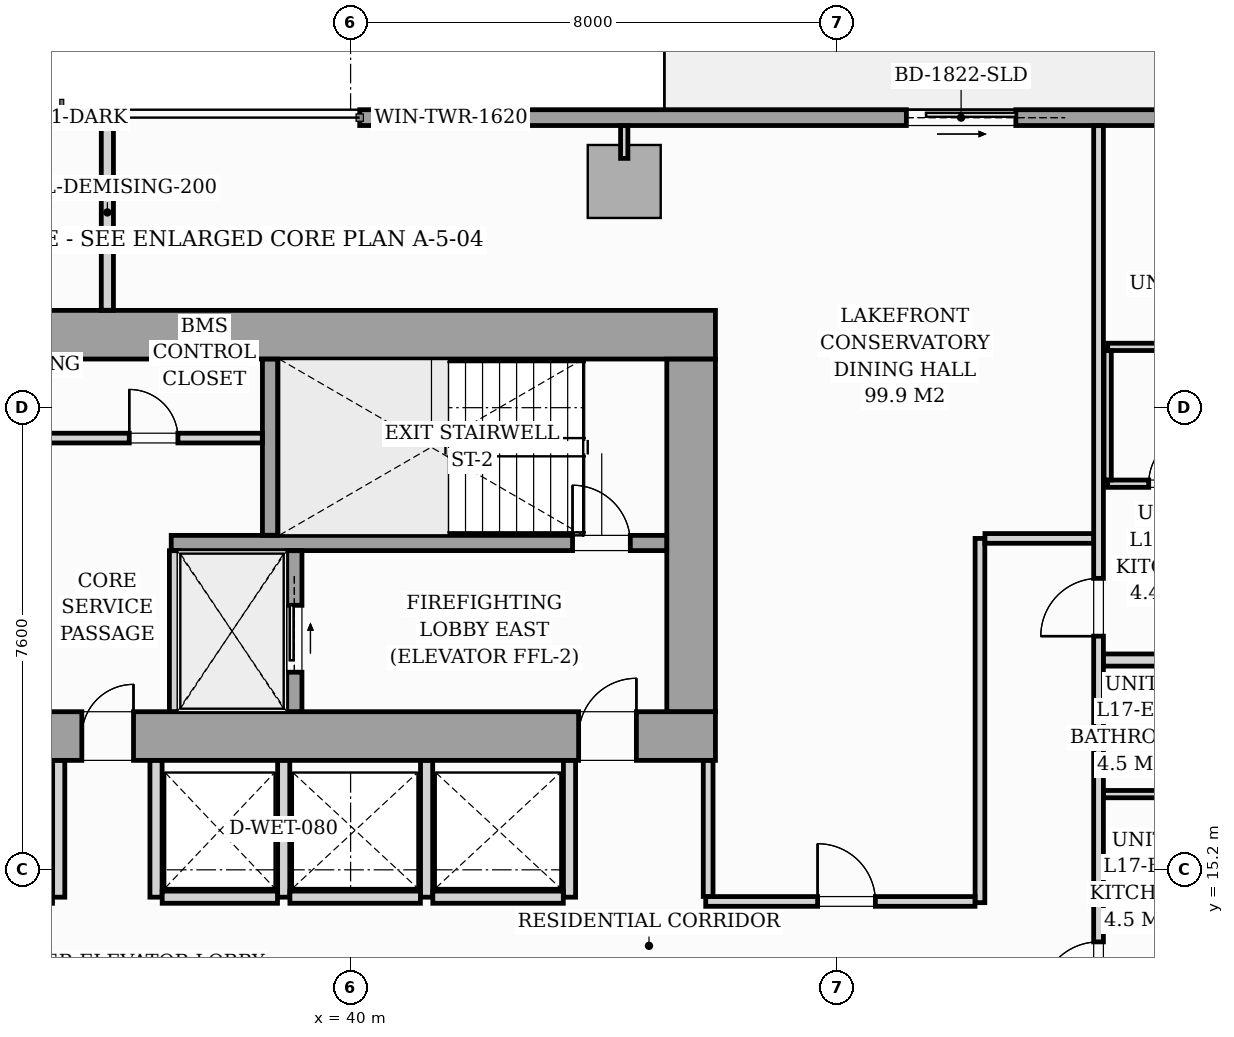
"""IFC4 building model, lengths in metres.
Left out: names, types, materials, properties, quantities, classifications, styles, units other than length and angle.
Written with IfcOpenShell. Run it as: python <this file> out.ifc"""

import sys

from ifc_helpers import new_model, si_unit, direction, frame, frame_2d, origin, origin_2d, place, context, subcontext, project, spatial, rectangle, i_section, extrude, source, transform, mapped, element, fill, save


model = new_model("IFC4")
c1 = context("Model", 3, precision=1e-05, world=origin(), true_north=direction((0.0, 1.0)))
c2 = subcontext(c1, "Body", "Model", "MODEL_VIEW")
j1 = project(units=[si_unit("LENGTHUNIT", "METRE"), si_unit("PLANEANGLEUNIT", "RADIAN")], contexts=[c1])
p1 = place(None, origin())
s1 = spatial("IfcSite", under=j1, at=p1, CompositionType="ELEMENT")
p2 = place(p1, origin())
s2 = spatial("IfcBuilding", under=s1, at=p2, CompositionType="ELEMENT")
p3 = place(p2, frame((0.0, 0.0, 61.4)))
s3 = spatial("IfcBuildingStorey", under=s2, at=p3, CompositionType="ELEMENT", Elevation=61.4)
m1 = source(origin(), c2, "Body", "SweptSolid", [
    extrude(i_section(OverallWidth=0.437, OverallDepth=0.514, WebThickness=0.061, FlangeThickness=0.097, FilletRadius=0.018, at=origin_2d()), origin(), (0.0, 0.0, 1.0), 3.196),
])
for number, where, z_axis, x_axis in (
    (1, (38.88, 17.4, 0.002), (0.0, 0.0, 1.0), (1.0, 0.0, 0.0)),
    (2, (45.6, 17.4, 0.002), (0.0, 0.0, 1.0), (1.0, 0.0, 0.0)),
    (3, (38.88, 24.0, 0.002), (0.0, 0.0, 1.0), (1.0, 0.0, 0.0)),
    (4, (45.6, 24.0, 0.002), (0.0, 0.0, 1.0), (1.0, 0.0, 0.0)),
):
    element("IfcColumn", number, at=place(p3, frame(where, z_axis=z_axis, x_axis=x_axis)), inside=s3, PredefinedType="PILASTER", context=c2, shape_type="MappedRepresentation", body=[
        mapped(m1, transform((0.0, 0.0, 0.0), scale=1.0)),
    ])
m2 = source(origin(), c2, "Body", "SweptSolid", [
    extrude(rectangle(XDim=1.2, YDim=1.2, at=origin_2d()), origin(), (0.0, 0.0, 1.0), 3.196),
])
p4 = place(p3, frame((44.5, 26.52, 0.002), z_axis=(0.0, 0.0, 1.0), x_axis=(1.0, 0.0, 0.0)))
e5 = element("IfcColumn", 5, at=p4, inside=s3, PredefinedType="COLUMN", context=c2, shape_type="MappedRepresentation", body=[
    mapped(m2, transform((0.0, 0.0, 0.0), scale=1.0)),
])
p5 = place(p3, frame((40.15, 27.57, 0.0), z_axis=(0.0, 0.0, 1.0), x_axis=(1.0, 0.0, 0.0)))
e6 = element("IfcWall", 6, at=p5, inside=s3, PredefinedType="STANDARD", context=c2, shape_type="SweptSolid", body=[
    extrude(rectangle(XDim=17.15, YDim=0.26, at=frame_2d((8.575, 0.0))), origin(), (0.0, 0.0, 1.0), 2.94),
])
p6 = place(p5, frame((8.99, 0.0, 0.0)))
e7 = element("IfcOpeningElement", 7, at=p6, cuts=e6, PredefinedType="OPENING", context=c2, shape_type="SweptSolid", body=[
    extrude(rectangle(XDim=1.8, YDim=2.06, at=frame_2d((0.9, 1.03))), frame((0.0, 0.14, 0.0), z_axis=(0.0, -1.0, 0.0), x_axis=(1.0, 0.0, 0.0)), (0.0, 0.0, 1.0), 0.28),
])
p7 = place(p5, frame((0.7, 0.0, 0.65)))
e8 = element("IfcOpeningElement", 8, at=p7, cuts=e6, PredefinedType="OPENING", context=c2, shape_type="SweptSolid", body=[
    extrude(rectangle(XDim=1.6, YDim=1.5, at=frame_2d((0.8, 0.75))), frame((0.0, 0.14, 0.0), z_axis=(0.0, -1.0, 0.0), x_axis=(1.0, 0.0, 0.0)), (0.0, 0.0, 1.0), 0.28),
])
p8 = place(p3, frame((26.0, 17.4, 0.0), z_axis=(0.0, 0.0, 1.0), x_axis=(1.0, 0.0, 0.0)))
e9 = element("IfcWall", 9, at=p8, inside=s3, PredefinedType="SHEAR", context=c2, shape_type="SweptSolid", body=[
    extrude(rectangle(XDim=20.0, YDim=0.8, at=frame_2d((10.0, 0.0))), origin(), (0.0, 0.0, 1.0), 3.2),
])
p9 = place(p8, frame((1.15, 0.0, 0.0)))
e10 = element("IfcOpeningElement", 10, at=p9, cuts=e9, PredefinedType="OPENING", context=c2, shape_type="SweptSolid", body=[
    extrude(rectangle(XDim=0.95, YDim=2.06, at=frame_2d((0.475, 1.03))), frame((0.0, 0.41, 0.0), z_axis=(0.0, -1.0, 0.0), x_axis=(1.0, 0.0, 0.0)), (0.0, 0.0, 1.0), 0.82),
])
p10 = place(p8, frame((9.58, 0.0, 0.0)))
e11 = element("IfcOpeningElement", 11, at=p10, cuts=e9, PredefinedType="OPENING", context=c2, shape_type="SweptSolid", body=[
    extrude(rectangle(XDim=0.85, YDim=2.0, at=frame_2d((0.425, 1.0))), frame((0.0, 0.41, 0.0), z_axis=(0.0, -1.0, 0.0), x_axis=(1.0, 0.0, 0.0)), (0.0, 0.0, 1.0), 0.82),
])
p11 = place(p8, frame((17.75, 0.0, 0.0)))
e12 = element("IfcOpeningElement", 12, at=p11, cuts=e9, PredefinedType="OPENING", context=c2, shape_type="SweptSolid", body=[
    extrude(rectangle(XDim=0.95, YDim=2.06, at=frame_2d((0.475, 1.03))), frame((0.0, 0.41, 0.0), z_axis=(0.0, -1.0, 0.0), x_axis=(1.0, 0.0, 0.0)), (0.0, 0.0, 1.0), 0.82),
])
p12 = place(p3, frame((26.0, 24.0, 0.0), z_axis=(0.0, 0.0, 1.0), x_axis=(1.0, 0.0, 0.0)))
e13 = element("IfcWall", 13, at=p12, inside=s3, PredefinedType="SHEAR", context=c2, shape_type="SweptSolid", body=[
    extrude(rectangle(XDim=20.0, YDim=0.8, at=frame_2d((10.0, 0.0))), origin(), (0.0, 0.0, 1.0), 3.2),
])
p13 = place(p3, frame((45.6, 17.802, 0.0), z_axis=(0.0, 0.0, 1.0), x_axis=(0.0, 1.0, 0.0)))
e14 = element("IfcWall", 14, at=p13, inside=s3, PredefinedType="SHEAR", context=c2, shape_type="SweptSolid", body=[
    extrude(rectangle(XDim=5.796, YDim=0.8, at=frame_2d((2.898, 0.0))), origin(), (0.0, 0.0, 1.0), 3.2),
])
p14 = place(p3, frame((37.05, 20.575, 0.0), z_axis=(0.0, 0.0, 1.0), x_axis=(1.0, 0.0, 0.0)))
e15 = element("IfcWall", 15, at=p14, inside=s3, PredefinedType="SOLIDWALL", context=c2, shape_type="SweptSolid", body=[
    extrude(rectangle(XDim=8.148, YDim=0.25, at=frame_2d((4.074, 0.0))), origin(), (0.0, 0.0, 1.0), 3.2),
])
p15 = place(p14, frame((6.6, 0.0, 0.0)))
e16 = element("IfcOpeningElement", 16, at=p15, cuts=e15, PredefinedType="OPENING", context=c2, shape_type="SweptSolid", body=[
    extrude(rectangle(XDim=0.95, YDim=2.06, at=frame_2d((0.475, 1.03))), frame((0.0, 0.135, 0.0), z_axis=(0.0, -1.0, 0.0), x_axis=(1.0, 0.0, 0.0)), (0.0, 0.0, 1.0), 0.27),
])
p16 = place(p3, frame((38.675, 20.702, 0.0), z_axis=(0.0, 0.0, 1.0), x_axis=(0.0, 1.0, 0.0)))
e17 = element("IfcWall", 17, at=p16, inside=s3, PredefinedType="SOLIDWALL", context=c2, shape_type="SweptSolid", body=[
    extrude(rectangle(XDim=2.896, YDim=0.25, at=frame_2d((1.448, 0.0))), origin(), (0.0, 0.0, 1.0), 3.2),
])
p17 = place(p3, frame((37.1, 17.802, 0.0), z_axis=(0.0, 0.0, 1.0), x_axis=(0.0, 1.0, 0.0)))
e18 = element("IfcWall", 18, at=p17, inside=s3, PredefinedType="PARTITIONING", context=c2, shape_type="SweptSolid", body=[
    extrude(rectangle(XDim=2.646, YDim=0.16, at=frame_2d((1.323, 0.0))), origin(), (0.0, 0.0, 1.0), 2.94),
])
p18 = place(p3, frame((39.075, 17.802, 0.0), z_axis=(0.0, 0.0, 1.0), x_axis=(0.0, 1.0, 0.0)))
e19 = element("IfcWall", 19, at=p18, inside=s3, PredefinedType="SOLIDWALL", context=c2, shape_type="SweptSolid", body=[
    extrude(rectangle(XDim=2.646, YDim=0.25, at=frame_2d((1.323, 0.0))), origin(), (0.0, 0.0, 1.0), 3.2),
])
p19 = place(p18, frame((0.648, 0.0, 0.0)))
e20 = element("IfcOpeningElement", 20, at=p19, cuts=e19, PredefinedType="OPENING", context=c2, shape_type="SweptSolid", body=[
    extrude(rectangle(XDim=1.1, YDim=2.08, at=frame_2d((0.55, 1.04))), frame((0.0, 0.135, 0.0), z_axis=(0.0, -1.0, 0.0), x_axis=(1.0, 0.0, 0.0)), (0.0, 0.0, 1.0), 0.27),
])
p20 = place(p3, frame((34.982, 22.3, 0.0), z_axis=(0.0, 0.0, 1.0), x_axis=(1.0, 0.0, 0.0)))
e21 = element("IfcWall", 21, at=p20, inside=s3, PredefinedType="PARTITIONING", context=c2, shape_type="SweptSolid", body=[
    extrude(rectangle(XDim=3.566, YDim=0.16, at=frame_2d((1.783, 0.0))), origin(), (0.0, 0.0, 1.0), 2.94),
])
p21 = place(p20, frame((1.378, 0.0, 0.0)))
e22 = element("IfcOpeningElement", 22, at=p21, cuts=e21, PredefinedType="OPENING", context=c2, shape_type="SweptSolid", body=[
    extrude(rectangle(XDim=0.8, YDim=2.05, at=frame_2d((0.4, 1.025))), frame((0.0, 0.09, 0.0), z_axis=(0.0, -1.0, 0.0), x_axis=(1.0, 0.0, 0.0)), (0.0, 0.0, 1.0), 0.18),
])
for number, where, z_axis, x_axis in (
    (23, (35.2, 14.75, 0.0), (0.0, 0.0, 1.0), (0.0, 1.0, 0.0)),
    (24, (36.8, 14.75, 0.0), (0.0, 0.0, 1.0), (0.0, 1.0, 0.0)),
    (25, (38.9, 14.75, 0.0), (0.0, 0.0, 1.0), (0.0, 1.0, 0.0)),
):
    element("IfcWall", number, at=place(p3, frame(where, z_axis=z_axis, x_axis=x_axis)), inside=s3, PredefinedType="PARTITIONING", context=c2, shape_type="SweptSolid", body=[
        extrude(rectangle(XDim=2.248, YDim=0.2, at=frame_2d((1.124, 0.0))), origin(), (0.0, 0.0, 1.0), 2.94),
    ])
p22 = place(p3, frame((36.902, 14.75, 0.0), z_axis=(0.0, 0.0, 1.0), x_axis=(1.0, 0.0, 0.0)))
e26 = element("IfcWall", 26, at=p22, inside=s3, PredefinedType="PARTITIONING", context=c2, shape_type="SweptSolid", body=[
    extrude(rectangle(XDim=1.896, YDim=0.2, at=frame_2d((0.948, 0.0))), origin(), (0.0, 0.0, 1.0), 2.94),
])
for number, where, z_axis, x_axis in (
    (27, (41.25, 14.75, 0.0), (0.0, 0.0, 1.0), (0.0, 1.0, 0.0)),
    (28, (43.6, 14.75, 0.0), (0.0, 0.0, 1.0), (0.0, 1.0, 0.0)),
):
    element("IfcWall", number, at=place(p3, frame(where, z_axis=z_axis, x_axis=x_axis)), inside=s3, PredefinedType="PARTITIONING", context=c2, shape_type="SweptSolid", body=[
        extrude(rectangle(XDim=2.248, YDim=0.2, at=frame_2d((1.124, 0.0))), origin(), (0.0, 0.0, 1.0), 2.94),
    ])
for number, where, z_axis, x_axis in (
    (29, (39.002, 14.75, 0.0), (0.0, 0.0, 1.0), (1.0, 0.0, 0.0)),
    (30, (41.352, 14.75, 0.0), (0.0, 0.0, 1.0), (1.0, 0.0, 0.0)),
):
    element("IfcWall", number, at=place(p3, frame(where, z_axis=z_axis, x_axis=x_axis)), inside=s3, PredefinedType="PARTITIONING", context=c2, shape_type="SweptSolid", body=[
        extrude(rectangle(XDim=2.146, YDim=0.2, at=frame_2d((1.073, 0.0))), origin(), (0.0, 0.0, 1.0), 2.94),
    ])
p23 = place(p3, frame((52.3, 12.572, 0.0), z_axis=(0.0, 0.0, 1.0), x_axis=(0.0, 1.0, 0.0)))
e31 = element("IfcWall", 31, at=p23, inside=s3, PredefinedType="PARTITIONING", context=c2, shape_type="SweptSolid", body=[
    extrude(rectangle(XDim=14.866, YDim=0.16, at=frame_2d((7.433, 0.0))), origin(), (0.0, 0.0, 1.0), 2.94),
])
p24 = place(p23, frame((0.493, 0.0, 0.0)))
e32 = element("IfcOpeningElement", 32, at=p24, cuts=e31, PredefinedType="OPENING", context=c2, shape_type="SweptSolid", body=[
    extrude(rectangle(XDim=0.95, YDim=2.06, at=frame_2d((0.475, 1.03))), frame((0.0, 0.09, 0.0), z_axis=(0.0, -1.0, 0.0), x_axis=(1.0, 0.0, 0.0)), (0.0, 0.0, 1.0), 0.18),
])
p25 = place(p23, frame((6.471, 0.0, 0.0)))
e33 = element("IfcOpeningElement", 33, at=p25, cuts=e31, PredefinedType="OPENING", context=c2, shape_type="SweptSolid", body=[
    extrude(rectangle(XDim=0.95, YDim=2.06, at=frame_2d((0.475, 1.03))), frame((0.0, 0.09, 0.0), z_axis=(0.0, -1.0, 0.0), x_axis=(1.0, 0.0, 0.0)), (0.0, 0.0, 1.0), 0.18),
])
p26 = place(p3, frame((36.0, 24.402, 0.0), z_axis=(0.0, 0.0, 1.0), x_axis=(0.0, 1.0, 0.0)))
e34 = element("IfcWall", 34, at=p26, inside=s3, PredefinedType="PARTITIONING", context=c2, shape_type="SweptSolid", body=[
    extrude(rectangle(XDim=3.218, YDim=0.2, at=frame_2d((1.609, 0.0))), origin(), (0.0, 0.0, 1.0), 2.94),
])
p27 = place(p3, frame((52.382, 18.65, 0.0), z_axis=(0.0, 0.0, 1.0), x_axis=(1.0, 0.0, 0.0)))
e35 = element("IfcWall", 35, at=p27, inside=s3, PredefinedType="PARTITIONING", context=c2, shape_type="SweptSolid", body=[
    extrude(rectangle(XDim=7.338, YDim=0.2, at=frame_2d((3.669, 0.0))), origin(), (0.0, 0.0, 1.0), 2.94),
])
p28 = place(p3, frame((52.382, 16.445, 0.0), z_axis=(0.0, 0.0, 1.0), x_axis=(1.0, 0.0, 0.0)))
e36 = element("IfcWall", 36, at=p28, inside=s3, PredefinedType="PARTITIONING", context=c2, shape_type="SweptSolid", body=[
    extrude(rectangle(XDim=2.256, YDim=0.12, at=frame_2d((1.128, 0.0))), origin(), (0.0, 0.0, 1.0), 2.045),
])
p29 = place(p3, frame((52.382, 14.34, 0.0), z_axis=(0.0, 0.0, 1.0), x_axis=(1.0, 0.0, 0.0)))
e37 = element("IfcWall", 37, at=p29, inside=s3, PredefinedType="PARTITIONING", context=c2, shape_type="SweptSolid", body=[
    extrude(rectangle(XDim=2.256, YDim=0.12, at=frame_2d((1.128, 0.0))), origin(), (0.0, 0.0, 1.0), 2.94),
])
p30 = place(p3, frame((52.45, 21.55, 0.0), z_axis=(0.0, 0.0, 1.0), x_axis=(1.0, 0.0, 0.0)))
e38 = element("IfcWall", 38, at=p30, inside=s3, PredefinedType="PARTITIONING", context=c2, shape_type="SweptSolid", body=[
    extrude(rectangle(XDim=4.2, YDim=0.12, at=frame_2d((2.1, 0.0))), origin(), (0.0, 0.0, 1.0), 2.94),
])
p31 = place(p30, frame((0.675, 0.0, 0.0)))
e39 = element("IfcOpeningElement", 39, at=p31, cuts=e38, PredefinedType="OPENING", context=c2, shape_type="SweptSolid", body=[
    extrude(rectangle(XDim=0.85, YDim=2.05, at=frame_2d((0.425, 1.025))), frame((0.0, 0.07, 0.0), z_axis=(0.0, -1.0, 0.0), x_axis=(1.0, 0.0, 0.0)), (0.0, 0.0, 1.0), 0.14),
])
p32 = place(p30, frame((2.8, 0.0, 0.0)))
e40 = element("IfcOpeningElement", 40, at=p32, cuts=e38, PredefinedType="OPENING", context=c2, shape_type="SweptSolid", body=[
    extrude(rectangle(XDim=0.8, YDim=2.02, at=frame_2d((0.4, 1.01))), frame((0.0, 0.07, 0.0), z_axis=(0.0, -1.0, 0.0), x_axis=(1.0, 0.0, 0.0)), (0.0, 0.0, 1.0), 0.14),
])
p33 = place(p3, frame((52.45, 23.8, 0.0), z_axis=(0.0, 0.0, 1.0), x_axis=(1.0, 0.0, 0.0)))
e41 = element("IfcWall", 41, at=p33, inside=s3, PredefinedType="PARTITIONING", context=c2, shape_type="SweptSolid", body=[
    extrude(rectangle(XDim=4.2, YDim=0.12, at=frame_2d((2.1, 0.0))), origin(), (0.0, 0.0, 1.0), 2.94),
])
p34 = place(p3, frame((52.45, 21.612, 0.0), z_axis=(0.0, 0.0, 1.0), x_axis=(0.0, 1.0, 0.0)))
e42 = element("IfcWall", 42, at=p34, inside=s3, PredefinedType="PARTITIONING", context=c2, shape_type="SweptSolid", body=[
    extrude(rectangle(XDim=2.126, YDim=0.12, at=frame_2d((1.063, 0.0))), origin(), (0.0, 0.0, 1.0), 2.94),
])
p35 = place(p3, frame((50.35, 14.66, 0.0), z_axis=(0.0, 0.0, 1.0), x_axis=(0.0, 1.0, 0.0)))
e43 = element("IfcWall", 43, at=p35, inside=s3, PredefinedType="PARTITIONING", context=c2, shape_type="SweptSolid", body=[
    extrude(rectangle(XDim=5.99, YDim=0.16, at=frame_2d((2.995, 0.0))), origin(), (0.0, 0.0, 1.0), 2.94),
])
p36 = place(p3, frame((50.432, 20.65, 0.0), z_axis=(0.0, 0.0, 1.0), x_axis=(1.0, 0.0, 0.0)))
e44 = element("IfcWall", 44, at=p36, inside=s3, PredefinedType="PARTITIONING", context=c2, shape_type="SweptSolid", body=[
    extrude(rectangle(XDim=1.786, YDim=0.16, at=frame_2d((0.893, 0.0))), origin(), (0.0, 0.0, 1.0), 2.94),
])
p37 = place(p3, frame((45.84, 14.68, 0.0), z_axis=(0.0, 0.0, 1.0), x_axis=(1.0, 0.0, 0.0)))
e45 = element("IfcWall", 45, at=p37, inside=s3, PredefinedType="PARTITIONING", context=c2, shape_type="SweptSolid", body=[
    extrude(rectangle(XDim=4.428, YDim=0.16, at=frame_2d((2.214, 0.0))), origin(), (0.0, 0.0, 1.0), 2.94),
])
p38 = place(p37, frame((1.84, 0.0, 0.0)))
e46 = element("IfcOpeningElement", 46, at=p38, cuts=e45, PredefinedType="OPENING", context=c2, shape_type="SweptSolid", body=[
    extrude(rectangle(XDim=0.95, YDim=2.06, at=frame_2d((0.475, 1.03))), frame((0.0, 0.09, 0.0), z_axis=(0.0, -1.0, 0.0), x_axis=(1.0, 0.0, 0.0)), (0.0, 0.0, 1.0), 0.18),
])
p39 = place(p3, frame((45.88, 14.762, 0.0), z_axis=(0.0, 0.0, 1.0), x_axis=(0.0, 1.0, 0.0)))
e47 = element("IfcWall", 47, at=p39, inside=s3, PredefinedType="PARTITIONING", context=c2, shape_type="SweptSolid", body=[
    extrude(rectangle(XDim=2.236, YDim=0.16, at=frame_2d((1.118, 0.0))), origin(), (0.0, 0.0, 1.0), 2.94),
])
p40 = place(p3, frame((44.5, 26.9, 0.0), z_axis=(0.0, 0.0, 1.0), x_axis=(0.0, 1.0, 0.0)))
e48 = element("IfcWall", 48, at=p40, inside=s3, PredefinedType="PARTITIONING", context=c2, shape_type="SweptSolid", body=[
    extrude(rectangle(XDim=0.538, YDim=0.12, at=frame_2d((0.269, 0.0))), origin(), (0.0, 0.0, 1.0), 2.94),
])
m3 = source(origin(), c2, "Body", "SweptSolid", [
    extrude(rectangle(XDim=1.8, YDim=2.06, at=frame_2d((0.9, 1.03))), frame((0.0, 0.025, 0.0), z_axis=(0.0, -1.0, 0.0), x_axis=(1.0, 0.0, 0.0)), (0.0, 0.0, 1.0), 0.05),
])
p41 = place(p6, origin())
e49 = element("IfcDoor", 49, at=p41, inside=s3, OperationType="SLIDING_TO_RIGHT", PredefinedType="DOOR", context=c2, shape_type="MappedRepresentation", body=[
    mapped(m3, transform((0.0, 0.0, 0.0), scale=1.0)),
])
fill(e7, e49)
m4 = source(origin(), c2, "Body", "SweptSolid", [
    extrude(rectangle(XDim=1.6, YDim=1.5, at=frame_2d((0.8, 0.75))), frame((0.0, 0.03, 0.0), z_axis=(0.0, -1.0, 0.0), x_axis=(1.0, 0.0, 0.0)), (0.0, 0.0, 1.0), 0.06),
])
p42 = place(p7, origin())
e50 = element("IfcWindow", 50, at=p42, inside=s3, PartitioningType="SINGLE_PANEL", PredefinedType="WINDOW", context=c2, shape_type="MappedRepresentation", body=[
    mapped(m4, transform((0.0, 0.0, 0.0), scale=1.0)),
])
fill(e8, e50)
m5 = source(origin(), c2, "Body", "SweptSolid", [
    extrude(rectangle(XDim=0.85, YDim=2.0, at=frame_2d((0.425, 1.0))), frame((0.0, 0.025, 0.0), z_axis=(0.0, -1.0, 0.0), x_axis=(1.0, 0.0, 0.0)), (0.0, 0.0, 1.0), 0.05),
])
p43 = place(p10, origin())
e51 = element("IfcDoor", 51, at=p43, inside=s3, OperationType="SINGLE_SWING_RIGHT", PredefinedType="DOOR", context=c2, shape_type="MappedRepresentation", body=[
    mapped(m5, transform((0.0, 0.0, 0.0), scale=1.0)),
])
fill(e11, e51)
m6 = source(origin(), c2, "Body", "SweptSolid", [
    extrude(rectangle(XDim=0.95, YDim=2.06, at=frame_2d((0.475, 1.03))), frame((0.0, 0.025, 0.0), z_axis=(0.0, -1.0, 0.0), x_axis=(1.0, 0.0, 0.0)), (0.0, 0.0, 1.0), 0.05),
])
p44 = place(p11, origin())
e52 = element("IfcDoor", 52, at=p44, inside=s3, OperationType="SINGLE_SWING_RIGHT", PredefinedType="DOOR", context=c2, shape_type="MappedRepresentation", body=[
    mapped(m6, transform((0.0, 0.0, 0.0), scale=1.0)),
])
fill(e12, e52)
p45 = place(p15, origin())
e53 = element("IfcDoor", 53, at=p45, inside=s3, OperationType="SINGLE_SWING_LEFT", PredefinedType="DOOR", context=c2, shape_type="MappedRepresentation", body=[
    mapped(m6, transform((0.0, 0.0, 0.0), scale=1.0)),
])
fill(e16, e53)
m7 = source(origin(), c2, "Body", "SweptSolid", [
    extrude(rectangle(XDim=1.1, YDim=2.08, at=frame_2d((0.55, 1.04))), frame((0.0, 0.025, 0.0), z_axis=(0.0, -1.0, 0.0), x_axis=(1.0, 0.0, 0.0)), (0.0, 0.0, 1.0), 0.05),
])
p46 = place(p19, origin())
e54 = element("IfcDoor", 54, at=p46, inside=s3, OperationType="SLIDING_TO_RIGHT", PredefinedType="DOOR", context=c2, shape_type="MappedRepresentation", body=[
    mapped(m7, transform((0.0, 0.0, 0.0), scale=1.0)),
])
fill(e20, e54)
m8 = source(origin(), c2, "Body", "SweptSolid", [
    extrude(rectangle(XDim=0.8, YDim=2.05, at=frame_2d((0.4, 1.025))), frame((0.0, 0.025, 0.0), z_axis=(0.0, -1.0, 0.0), x_axis=(1.0, 0.0, 0.0)), (0.0, 0.0, 1.0), 0.05),
])
p47 = place(p21, origin())
e55 = element("IfcDoor", 55, at=p47, inside=s3, OperationType="SINGLE_SWING_LEFT", PredefinedType="DOOR", context=c2, shape_type="MappedRepresentation", body=[
    mapped(m8, transform((0.0, 0.0, 0.0), scale=1.0)),
])
fill(e22, e55)
m9 = source(origin(), c2, "Body", "SweptSolid", [
    extrude(rectangle(XDim=0.95, YDim=2.06, at=frame_2d((0.475, 1.03))), frame((0.0, 0.025, 0.0), z_axis=(0.0, -1.0, 0.0), x_axis=(1.0, 0.0, 0.0)), (0.0, 0.0, 1.0), 0.05),
])
p48 = place(p24, origin())
e56 = element("IfcDoor", 56, at=p48, inside=s3, OperationType="SINGLE_SWING_LEFT", PredefinedType="DOOR", context=c2, shape_type="MappedRepresentation", body=[
    mapped(m9, transform((0.0, 0.0, 0.0), scale=1.0)),
])
fill(e32, e56)
p49 = place(p25, origin())
e57 = element("IfcDoor", 57, at=p49, inside=s3, OperationType="SINGLE_SWING_LEFT", PredefinedType="DOOR", context=c2, shape_type="MappedRepresentation", body=[
    mapped(m9, transform((0.0, 0.0, 0.0), scale=1.0)),
])
fill(e33, e57)
m10 = source(origin(), c2, "Body", "SweptSolid", [
    extrude(rectangle(XDim=0.85, YDim=2.05, at=frame_2d((0.425, 1.025))), frame((0.0, 0.025, 0.0), z_axis=(0.0, -1.0, 0.0), x_axis=(1.0, 0.0, 0.0)), (0.0, 0.0, 1.0), 0.05),
])
p50 = place(p31, origin())
e58 = element("IfcDoor", 58, at=p50, inside=s3, OperationType="SINGLE_SWING_RIGHT", PredefinedType="DOOR", context=c2, shape_type="MappedRepresentation", body=[
    mapped(m10, transform((0.0, 0.0, 0.0), scale=1.0)),
])
fill(e39, e58)
p51 = place(p38, origin())
e59 = element("IfcDoor", 59, at=p51, inside=s3, OperationType="SINGLE_SWING_LEFT", PredefinedType="DOOR", context=c2, shape_type="MappedRepresentation", body=[
    mapped(m9, transform((0.0, 0.0, 0.0), scale=1.0)),
])
fill(e46, e59)
save(model, sys.argv[1])
